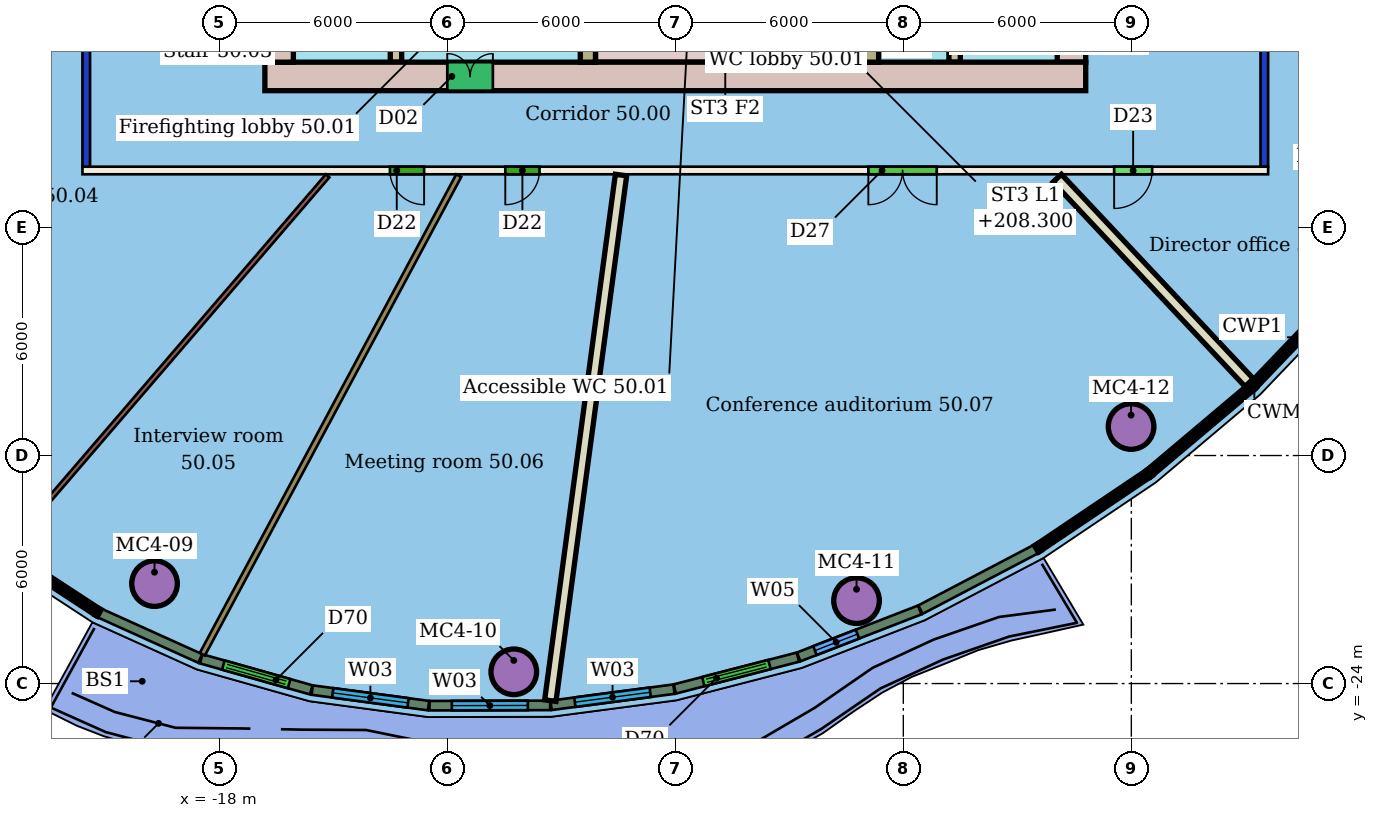
"""IFC4 building model, lengths in metres.
Left out: names, types, materials, properties, quantities, classifications, styles, units other than length and angle.
Written with IfcOpenShell. Run it as: python <this file> out.ifc"""

import sys

from ifc_helpers import new_model, si_unit, direction, frame, frame_2d, origin, origin_2d, place, context, subcontext, project, spatial, rectangle, hollow_circle, extrude, element, fill, save


model = new_model("IFC4")
c1 = context("Model", 3, precision=1e-05, world=origin(), true_north=direction((0.0, 1.0)))
c2 = subcontext(c1, "Body", "Model", "MODEL_VIEW")
j1 = project(units=[si_unit("LENGTHUNIT", "METRE"), si_unit("PLANEANGLEUNIT", "RADIAN")], contexts=[c1])
p1 = place(None, origin())
s1 = spatial("IfcSite", under=j1, at=p1, CompositionType="ELEMENT")
p2 = place(p1, origin())
s2 = spatial("IfcBuilding", under=s1, at=p2, CompositionType="ELEMENT")
p3 = place(p2, frame((0.0, 0.0, 206.5)))
s3 = spatial("IfcBuildingStorey", under=s2, at=p3, CompositionType="ELEMENT", Elevation=206.5)
for number, where, z_axis, x_axis in (
    (1, (-19.704, -21.37, 0.0), (0.0, 0.0, 1.0), (1.0, 0.0, 0.0)),
    (2, (-10.25, -23.691, 0.0), (0.0, 0.0, 1.0), (1.0, 0.0, 0.0)),
    (3, (-1.231, -21.819, 0.0), (0.0, 0.0, 1.0), (1.0, 0.0, 0.0)),
    (4, (5.993, -17.237, 0.0), (0.0, 0.0, 1.0), (1.0, 0.0, 0.0)),
):
    element("IfcColumn", number, at=place(p3, frame(where, z_axis=z_axis, x_axis=x_axis)), inside=s3, PredefinedType="COLUMN", context=c2, shape_type="SweptSolid", body=[
        extrude(hollow_circle(Radius=0.6, WallThickness=0.045, at=origin_2d()), origin(), (0.0, 0.0, 1.0), 3.45),
    ])
p4 = place(p3, frame((9.6, -10.5, 0.0), z_axis=(0.0, 0.0, 1.0), x_axis=(-1.0, 0.0, 0.0)))
e5 = element("IfcWall", 5, at=p4, inside=s3, PredefinedType="PARTITIONING", context=c2, shape_type="SweptSolid", body=[
    extrude(rectangle(XDim=31.2, YDim=0.2, at=frame_2d((15.6, 0.0))), origin(), (0.0, 0.0, 1.0), 3.45),
])
p5 = place(p4, frame((22.21, 0.0, 0.0)))
e6 = element("IfcOpeningElement", 6, at=p5, cuts=e5, PredefinedType="OPENING", context=c2, shape_type="SweptSolid", body=[
    extrude(rectangle(XDim=0.9, YDim=2.1, at=frame_2d((0.45, 1.05))), frame((0.0, 0.11, 0.0), z_axis=(0.0, -1.0, 0.0), x_axis=(1.0, 0.0, 0.0)), (0.0, 0.0, 1.0), 0.22),
])
p6 = place(p4, frame((19.173, 0.0, 0.0)))
e7 = element("IfcOpeningElement", 7, at=p6, cuts=e5, PredefinedType="OPENING", context=c2, shape_type="SweptSolid", body=[
    extrude(rectangle(XDim=0.9, YDim=2.1, at=frame_2d((0.45, 1.05))), frame((0.0, 0.11, 0.0), z_axis=(0.0, -1.0, 0.0), x_axis=(1.0, 0.0, 0.0)), (0.0, 0.0, 1.0), 0.22),
])
p7 = place(p4, frame((8.72, 0.0, 0.0)))
e8 = element("IfcOpeningElement", 8, at=p7, cuts=e5, PredefinedType="OPENING", context=c2, shape_type="SweptSolid", body=[
    extrude(rectangle(XDim=1.8, YDim=2.4, at=frame_2d((0.9, 1.2))), frame((0.0, 0.11, 0.0), z_axis=(0.0, -1.0, 0.0), x_axis=(1.0, 0.0, 0.0)), (0.0, 0.0, 1.0), 0.22),
])
p8 = place(p4, frame((3.052, 0.0, 0.0)))
e9 = element("IfcOpeningElement", 9, at=p8, cuts=e5, PredefinedType="OPENING", context=c2, shape_type="SweptSolid", body=[
    extrude(rectangle(XDim=1.0, YDim=2.4, at=frame_2d((0.5, 1.2))), frame((0.0, 0.11, 0.0), z_axis=(0.0, -1.0, 0.0), x_axis=(1.0, 0.0, 0.0)), (0.0, 0.0, 1.0), 0.22),
])
p9 = place(p3, frame((-21.5, -10.4, 0.0), z_axis=(0.0, 0.0, 1.0), x_axis=(0.0, 1.0, 0.0)))
e10 = element("IfcWall", 10, at=p9, inside=s3, PredefinedType="PARTITIONING", context=c2, shape_type="SweptSolid", body=[
    extrude(rectangle(XDim=20.8, YDim=0.2, at=frame_2d((10.4, 0.0))), origin(), (0.0, 0.0, 1.0), 3.05),
])
p10 = place(p9, frame((6.461, 0.0, 0.0)))
e11 = element("IfcOpeningElement", 11, at=p10, cuts=e10, PredefinedType="OPENING", context=c2, shape_type="SweptSolid", body=[
    extrude(rectangle(XDim=1.8, YDim=2.1, at=frame_2d((0.9, 1.05))), frame((0.0, 0.11, 0.0), z_axis=(0.0, -1.0, 0.0), x_axis=(1.0, 0.0, 0.0)), (0.0, 0.0, 1.0), 0.22),
])
p11 = place(p3, frame((9.5, 10.4, 0.0), z_axis=(0.0, 0.0, 1.0), x_axis=(0.0, -1.0, 0.0)))
e12 = element("IfcWall", 12, at=p11, inside=s3, PredefinedType="PARTITIONING", context=c2, shape_type="SweptSolid", body=[
    extrude(rectangle(XDim=20.8, YDim=0.2, at=frame_2d((10.4, 0.0))), origin(), (0.0, 0.0, 1.0), 3.05),
])
p12 = place(p11, frame((8.246, 0.0, 0.0)))
e13 = element("IfcOpeningElement", 13, at=p12, cuts=e12, PredefinedType="OPENING", context=c2, shape_type="SweptSolid", body=[
    extrude(rectangle(XDim=1.5, YDim=2.1, at=frame_2d((0.75, 1.05))), frame((0.0, 0.11, 0.0), z_axis=(0.0, -1.0, 0.0), x_axis=(1.0, 0.0, 0.0)), (0.0, 0.0, 1.0), 0.22),
])
p13 = place(p3, frame((-23.564, -20.427, 0.0), z_axis=(0.0, 0.0, 1.0), x_axis=(0.651952710233, 0.758259628109, 0.0)))
e14 = element("IfcWall", 14, at=p13, inside=s3, PredefinedType="PARTITIONING", context=c2, shape_type="SweptSolid", body=[
    extrude(rectangle(XDim=12.907, YDim=0.125, at=frame_2d((6.453, 0.0))), origin(), (0.0, 0.0, 1.0), 3.45),
])
p14 = place(p3, frame((-18.445, -23.228, 0.0), z_axis=(0.0, 0.0, 1.0), x_axis=(0.472259350385, 0.881459645119, 0.0)))
e15 = element("IfcWall", 15, at=p14, inside=s3, PredefinedType="PARTITIONING", context=c2, shape_type="SweptSolid", body=[
    extrude(rectangle(XDim=14.286, YDim=0.15, at=frame_2d((7.143, 0.0))), origin(), (0.0, 0.0, 1.0), 3.45),
])
p15 = place(p3, frame((-9.289, -24.45, 0.0), z_axis=(0.0, 0.0, 1.0), x_axis=(0.133318818673, 0.991073202436, 0.0)))
e16 = element("IfcWall", 16, at=p15, inside=s3, PredefinedType="PARTITIONING", context=c2, shape_type="SweptSolid", body=[
    extrude(rectangle(XDim=13.954, YDim=0.3, at=frame_2d((6.977, 0.0))), origin(), (0.0, 0.0, 1.0), 3.45),
])
p16 = place(p3, frame((9.102, -16.082, 0.0), z_axis=(0.0, 0.0, 1.0), x_axis=(-0.684541774507, 0.728973633923, 0.0)))
e17 = element("IfcWall", 17, at=p16, inside=s3, PredefinedType="PARTITIONING", context=c2, shape_type="SweptSolid", body=[
    extrude(rectangle(XDim=7.379, YDim=0.3, at=frame_2d((3.69, 0.0))), origin(), (0.0, 0.0, 1.0), 3.45),
])
p17 = place(p3, frame((15.501, -7.756, 0.0), z_axis=(0.0, 0.0, 1.0), x_axis=(-0.940683105583, 0.339286449583, 0.0)))
e18 = element("IfcWall", 18, at=p17, inside=s3, PredefinedType="PARTITIONING", context=c2, shape_type="SweptSolid", body=[
    extrude(rectangle(XDim=6.251, YDim=0.125, at=frame_2d((3.125, 0.0))), origin(), (0.0, 0.0, 1.0), 3.45),
])
p18 = place(p3, frame((-21.144, -22.147, 0.0), z_axis=(0.0, 0.0, 1.0), x_axis=(0.91141845893, -0.411480731897, 0.0)))
e19 = element("IfcWall", 19, at=p18, inside=s3, PredefinedType="SOLIDWALL", context=c2, shape_type="SweptSolid", body=[
    extrude(rectangle(XDim=2.901, YDim=0.25, at=frame_2d((1.45, 0.0))), origin(), (0.0, 0.0, 1.0), 3.1),
])
p19 = place(p3, frame((-18.475, -23.349, 0.0), z_axis=(0.0, 0.0, 1.0), x_axis=(0.962400743331, -0.271633593717, 0.0)))
e20 = element("IfcWall", 20, at=p19, inside=s3, PredefinedType="SOLIDWALL", context=c2, shape_type="SweptSolid", body=[
    extrude(rectangle(XDim=3.009, YDim=0.25, at=frame_2d((1.504, 0.0))), origin(), (0.0, 0.0, 1.0), 3.1),
])
p20 = place(p19, frame((0.604, 0.0, 0.0)))
e21 = element("IfcOpeningElement", 21, at=p20, cuts=e20, PredefinedType="OPENING", context=c2, shape_type="SweptSolid", body=[
    extrude(rectangle(XDim=1.8, YDim=2.4, at=frame_2d((0.9, 1.2))), frame((0.0, 0.135, 0.0), z_axis=(0.0, -1.0, 0.0), x_axis=(1.0, 0.0, 0.0)), (0.0, 0.0, 1.0), 0.27),
])
p21 = place(p3, frame((-15.554, -24.172, 0.0), z_axis=(0.0, 0.0, 1.0), x_axis=(0.99120717839, -0.132319044388, 0.0)))
e22 = element("IfcWall", 22, at=p21, inside=s3, PredefinedType="SOLIDWALL", context=c2, shape_type="SweptSolid", body=[
    extrude(rectangle(XDim=3.089, YDim=0.25, at=frame_2d((1.544, 0.0))), origin(), (0.0, 0.0, 1.0), 3.1),
])
p22 = place(p21, frame((0.544, 0.0, 0.9)))
e23 = element("IfcOpeningElement", 23, at=p22, cuts=e22, PredefinedType="OPENING", context=c2, shape_type="SweptSolid", body=[
    extrude(rectangle(XDim=2.0, YDim=2.1, at=frame_2d((1.0, 1.05))), frame((0.0, 0.135, 0.0), z_axis=(0.0, -1.0, 0.0), x_axis=(1.0, 0.0, 0.0)), (0.0, 0.0, 1.0), 0.27),
])
p23 = place(p3, frame((-12.468, -24.582, 0.0), z_axis=(0.0, 0.0, 1.0), x_axis=(0.999996972757, 0.002460584631, 0.0)))
e24 = element("IfcWall", 24, at=p23, inside=s3, PredefinedType="SOLIDWALL", context=c2, shape_type="SweptSolid", body=[
    extrude(rectangle(XDim=3.175, YDim=0.25, at=frame_2d((1.587, 0.0))), origin(), (0.0, 0.0, 1.0), 3.1),
])
p24 = place(p23, frame((0.588, 0.0, 0.9)))
e25 = element("IfcOpeningElement", 25, at=p24, cuts=e24, PredefinedType="OPENING", context=c2, shape_type="SweptSolid", body=[
    extrude(rectangle(XDim=2.0, YDim=2.1, at=frame_2d((1.0, 1.05))), frame((0.0, 0.135, 0.0), z_axis=(0.0, -1.0, 0.0), x_axis=(1.0, 0.0, 0.0)), (0.0, 0.0, 1.0), 0.27),
])
p25 = place(p3, frame((-9.269, -24.573, 0.0), z_axis=(0.0, 0.0, 1.0), x_axis=(0.991444867529, 0.130526145465, 0.0)))
e26 = element("IfcWall", 26, at=p25, inside=s3, PredefinedType="SOLIDWALL", context=c2, shape_type="SweptSolid", body=[
    extrude(rectangle(XDim=3.262, YDim=0.25, at=frame_2d((1.631, 0.0))), origin(), (0.0, 0.0, 1.0), 3.1),
])
p26 = place(p25, frame((0.631, 0.0, 0.9)))
e27 = element("IfcOpeningElement", 27, at=p26, cuts=e26, PredefinedType="OPENING", context=c2, shape_type="SweptSolid", body=[
    extrude(rectangle(XDim=2.0, YDim=2.1, at=frame_2d((1.0, 1.05))), frame((0.0, 0.135, 0.0), z_axis=(0.0, -1.0, 0.0), x_axis=(1.0, 0.0, 0.0)), (0.0, 0.0, 1.0), 0.27),
])
p27 = place(p3, frame((-6.011, -24.143, 0.0), z_axis=(0.0, 0.0, 1.0), x_axis=(0.968152404137, 0.250361583242, 0.0)))
e28 = element("IfcWall", 28, at=p27, inside=s3, PredefinedType="SOLIDWALL", context=c2, shape_type="SweptSolid", body=[
    extrude(rectangle(XDim=3.344, YDim=0.25, at=frame_2d((1.672, 0.0))), origin(), (0.0, 0.0, 1.0), 3.1),
])
p28 = place(p27, frame((0.772, 0.0, 0.0)))
e29 = element("IfcOpeningElement", 29, at=p28, cuts=e28, PredefinedType="OPENING", context=c2, shape_type="SweptSolid", body=[
    extrude(rectangle(XDim=1.8, YDim=2.4, at=frame_2d((0.9, 1.2))), frame((0.0, 0.135, 0.0), z_axis=(0.0, -1.0, 0.0), x_axis=(1.0, 0.0, 0.0)), (0.0, 0.0, 1.0), 0.27),
])
p29 = place(p3, frame((-2.753, -23.299, 0.0), z_axis=(0.0, 0.0, 1.0), x_axis=(0.932349015041, 0.361559558236, 0.0)))
e30 = element("IfcWall", 30, at=p29, inside=s3, PredefinedType="SOLIDWALL", context=c2, shape_type="SweptSolid", body=[
    extrude(rectangle(XDim=3.415, YDim=0.25, at=frame_2d((1.708, 0.0))), origin(), (0.0, 0.0, 1.0), 3.1),
])
p30 = place(p29, frame((0.458, 0.0, 0.9)))
e31 = element("IfcOpeningElement", 31, at=p30, cuts=e30, PredefinedType="OPENING", context=c2, shape_type="SweptSolid", body=[
    extrude(rectangle(XDim=1.2, YDim=2.1, at=frame_2d((0.6, 1.05))), frame((0.0, 0.135, 0.0), z_axis=(0.0, -1.0, 0.0), x_axis=(1.0, 0.0, 0.0)), (0.0, 0.0, 1.0), 0.27),
])
p31 = place(p3, frame((0.452, -22.054, 0.0), z_axis=(0.0, 0.0, 1.0), x_axis=(0.885763231358, 0.464137369724, 0.0)))
e32 = element("IfcWall", 32, at=p31, inside=s3, PredefinedType="SOLIDWALL", context=c2, shape_type="SweptSolid", body=[
    extrude(rectangle(XDim=3.428, YDim=0.25, at=frame_2d((1.714, 0.0))), origin(), (0.0, 0.0, 1.0), 3.1),
])
p32 = place(p3, frame((-16.8, -8.025, 0.0), z_axis=(0.0, 0.0, 1.0), x_axis=(1.0, 0.0, 0.0)))
e33 = element("IfcWall", 33, at=p32, inside=s3, PredefinedType="SHEAR", context=c2, shape_type="SweptSolid", body=[
    extrude(rectangle(XDim=21.6, YDim=0.75, at=frame_2d((10.8, 0.0))), origin(), (0.0, 0.0, 1.0), 3.3),
])
p33 = place(p32, frame((4.8, 0.0, 0.0)))
e34 = element("IfcOpeningElement", 34, at=p33, cuts=e33, PredefinedType="OPENING", context=c2, shape_type="SweptSolid", body=[
    extrude(rectangle(XDim=1.2, YDim=2.1, at=frame_2d((0.6, 1.05))), frame((0.0, 0.385, 0.0), z_axis=(0.0, -1.0, 0.0), x_axis=(1.0, 0.0, 0.0)), (0.0, 0.0, 1.0), 0.77),
])
p34 = place(p3, frame((-16.425, 7.65, 0.0), z_axis=(0.0, 0.0, 1.0), x_axis=(0.0, -1.0, 0.0)))
e35 = element("IfcWall", 35, at=p34, inside=s3, PredefinedType="SHEAR", context=c2, shape_type="SweptSolid", body=[
    extrude(rectangle(XDim=15.3, YDim=0.75, at=frame_2d((7.65, 0.0))), origin(), (0.0, 0.0, 1.0), 3.3),
])
p35 = place(p34, frame((11.25, 0.0, 0.0)))
e36 = element("IfcOpeningElement", 36, at=p35, cuts=e35, PredefinedType="OPENING", context=c2, shape_type="SweptSolid", body=[
    extrude(rectangle(XDim=1.2, YDim=2.1, at=frame_2d((0.6, 1.05))), frame((0.0, 0.385, 0.0), z_axis=(0.0, -1.0, 0.0), x_axis=(1.0, 0.0, 0.0)), (0.0, 0.0, 1.0), 0.77),
])
p36 = place(p34, frame((2.85, 0.0, 0.0)))
e37 = element("IfcOpeningElement", 37, at=p36, cuts=e35, PredefinedType="OPENING", context=c2, shape_type="SweptSolid", body=[
    extrude(rectangle(XDim=1.2, YDim=2.1, at=frame_2d((0.6, 1.05))), frame((0.0, 0.385, 0.0), z_axis=(0.0, -1.0, 0.0), x_axis=(1.0, 0.0, 0.0)), (0.0, 0.0, 1.0), 0.77),
])
p37 = place(p3, frame((4.425, -7.65, 0.0), z_axis=(0.0, 0.0, 1.0), x_axis=(0.0, 1.0, 0.0)))
e38 = element("IfcWall", 38, at=p37, inside=s3, PredefinedType="SHEAR", context=c2, shape_type="SweptSolid", body=[
    extrude(rectangle(XDim=15.3, YDim=0.75, at=frame_2d((7.65, 0.0))), origin(), (0.0, 0.0, 1.0), 3.3),
])
p38 = place(p37, frame((2.85, 0.0, 0.0)))
e39 = element("IfcOpeningElement", 39, at=p38, cuts=e38, PredefinedType="OPENING", context=c2, shape_type="SweptSolid", body=[
    extrude(rectangle(XDim=1.2, YDim=2.1, at=frame_2d((0.6, 1.05))), frame((0.0, 0.385, 0.0), z_axis=(0.0, -1.0, 0.0), x_axis=(1.0, 0.0, 0.0)), (0.0, 0.0, 1.0), 0.77),
])
p39 = place(p37, frame((11.25, 0.0, 0.0)))
e40 = element("IfcOpeningElement", 40, at=p39, cuts=e38, PredefinedType="OPENING", context=c2, shape_type="SweptSolid", body=[
    extrude(rectangle(XDim=1.2, YDim=2.1, at=frame_2d((0.6, 1.05))), frame((0.0, 0.385, 0.0), z_axis=(0.0, -1.0, 0.0), x_axis=(1.0, 0.0, 0.0)), (0.0, 0.0, 1.0), 0.77),
])
p40 = place(p3, frame((-13.35, 7.65, 0.0), z_axis=(0.0, 0.0, 1.0), x_axis=(0.0, -1.0, 0.0)))
e41 = element("IfcWall", 41, at=p40, inside=s3, PredefinedType="SHEAR", context=c2, shape_type="SweptSolid", body=[
    extrude(rectangle(XDim=15.3, YDim=0.3, at=frame_2d((7.65, 0.0))), origin(), (0.0, 0.0, 1.0), 3.3),
])
p41 = place(p40, frame((6.9, 0.0, 0.0)))
e42 = element("IfcOpeningElement", 42, at=p41, cuts=e41, PredefinedType="OPENING", context=c2, shape_type="SweptSolid", body=[
    extrude(rectangle(XDim=1.5, YDim=2.1, at=frame_2d((0.75, 1.05))), frame((0.0, 0.16, 0.0), z_axis=(0.0, -1.0, 0.0), x_axis=(1.0, 0.0, 0.0)), (0.0, 0.0, 1.0), 0.32),
])
p42 = place(p3, frame((1.35, -7.65, 0.0), z_axis=(0.0, 0.0, 1.0), x_axis=(0.0, 1.0, 0.0)))
e43 = element("IfcWall", 43, at=p42, inside=s3, PredefinedType="SHEAR", context=c2, shape_type="SweptSolid", body=[
    extrude(rectangle(XDim=15.3, YDim=0.3, at=frame_2d((7.65, 0.0))), origin(), (0.0, 0.0, 1.0), 3.3),
])
p43 = place(p42, frame((1.56, 0.0, 0.0)))
e44 = element("IfcOpeningElement", 44, at=p43, cuts=e43, PredefinedType="OPENING", context=c2, shape_type="SweptSolid", body=[
    extrude(rectangle(XDim=1.0, YDim=2.1, at=frame_2d((0.5, 1.05))), frame((0.0, 0.16, 0.0), z_axis=(0.0, -1.0, 0.0), x_axis=(1.0, 0.0, 0.0)), (0.0, 0.0, 1.0), 0.32),
])
p44 = place(p42, frame((6.9, 0.0, 0.0)))
e45 = element("IfcOpeningElement", 45, at=p44, cuts=e43, PredefinedType="OPENING", context=c2, shape_type="SweptSolid", body=[
    extrude(rectangle(XDim=1.5, YDim=2.1, at=frame_2d((0.75, 1.05))), frame((0.0, 0.16, 0.0), z_axis=(0.0, -1.0, 0.0), x_axis=(1.0, 0.0, 0.0)), (0.0, 0.0, 1.0), 0.32),
])
p45 = place(p3, frame((-8.3, -3.88, 0.0), z_axis=(0.0, 0.0, 1.0), x_axis=(0.0, -1.0, 0.0)))
e46 = element("IfcWall", 46, at=p45, inside=s3, PredefinedType="SHEAR", context=c2, shape_type="SweptSolid", body=[
    extrude(rectangle(XDim=3.77, YDim=0.4, at=frame_2d((1.885, 0.0))), origin(), (0.0, 0.0, 1.0), 3.3),
])
p46 = place(p45, frame((1.11, 0.0, 0.0)))
e47 = element("IfcOpeningElement", 47, at=p46, cuts=e46, PredefinedType="OPENING", context=c2, shape_type="SweptSolid", body=[
    extrude(rectangle(XDim=1.2, YDim=2.1, at=frame_2d((0.6, 1.05))), frame((0.0, 0.21, 0.0), z_axis=(0.0, -1.0, 0.0), x_axis=(1.0, 0.0, 0.0)), (0.0, 0.0, 1.0), 0.42),
])
p47 = place(p3, frame((-0.85, -3.88, 0.0), z_axis=(0.0, 0.0, 1.0), x_axis=(0.0, -1.0, 0.0)))
e48 = element("IfcWall", 48, at=p47, inside=s3, PredefinedType="SHEAR", context=c2, shape_type="SweptSolid", body=[
    extrude(rectangle(XDim=3.77, YDim=0.4, at=frame_2d((1.885, 0.0))), origin(), (0.0, 0.0, 1.0), 3.3),
])
p48 = place(p3, frame((-8.1, -7.475, 0.0), z_axis=(0.0, 0.0, 1.0), x_axis=(1.0, 0.0, 0.0)))
e49 = element("IfcWall", 49, at=p48, inside=s3, PredefinedType="SHEAR", context=c2, shape_type="SweptSolid", body=[
    extrude(rectangle(XDim=7.05, YDim=0.35, at=frame_2d((3.525, 0.0))), origin(), (0.0, 0.0, 1.0), 3.3),
])
p49 = place(p5, origin())
e50 = element("IfcDoor", 50, at=p49, inside=s3, OperationType="SINGLE_SWING_LEFT", PredefinedType="DOOR", context=c2, shape_type="SweptSolid", body=[
    extrude(rectangle(XDim=0.9, YDim=2.1, at=frame_2d((0.45, 1.05))), frame((0.0, 0.025, 0.0), z_axis=(0.0, -1.0, 0.0), x_axis=(1.0, 0.0, 0.0)), (0.0, 0.0, 1.0), 0.05),
])
fill(e6, e50)
p50 = place(p6, origin())
e51 = element("IfcDoor", 51, at=p50, inside=s3, OperationType="SINGLE_SWING_RIGHT", PredefinedType="DOOR", context=c2, shape_type="SweptSolid", body=[
    extrude(rectangle(XDim=0.9, YDim=2.1, at=frame_2d((0.45, 1.05))), frame((0.0, 0.025, 0.0), z_axis=(0.0, -1.0, 0.0), x_axis=(1.0, 0.0, 0.0)), (0.0, 0.0, 1.0), 0.05),
])
fill(e7, e51)
p51 = place(p7, origin())
e52 = element("IfcDoor", 52, at=p51, inside=s3, OperationType="DOUBLE_DOOR_SINGLE_SWING", PredefinedType="DOOR", context=c2, shape_type="SweptSolid", body=[
    extrude(rectangle(XDim=1.8, YDim=2.4, at=frame_2d((0.9, 1.2))), frame((0.0, 0.025, 0.0), z_axis=(0.0, -1.0, 0.0), x_axis=(1.0, 0.0, 0.0)), (0.0, 0.0, 1.0), 0.05),
])
fill(e8, e52)
p52 = place(p8, origin())
e53 = element("IfcDoor", 53, at=p52, inside=s3, OperationType="SINGLE_SWING_RIGHT", PredefinedType="DOOR", context=c2, shape_type="SweptSolid", body=[
    extrude(rectangle(XDim=1.0, YDim=2.4, at=frame_2d((0.5, 1.2))), frame((0.0, 0.025, 0.0), z_axis=(0.0, -1.0, 0.0), x_axis=(1.0, 0.0, 0.0)), (0.0, 0.0, 1.0), 0.05),
])
fill(e9, e53)
p53 = place(p20, origin())
e54 = element("IfcDoor", 54, at=p53, inside=s3, OperationType="DOUBLE_DOOR_SLIDING", PredefinedType="DOOR", context=c2, shape_type="SweptSolid", body=[
    extrude(rectangle(XDim=1.8, YDim=2.4, at=frame_2d((0.9, 1.2))), frame((0.0, 0.025, 0.0), z_axis=(0.0, -1.0, 0.0), x_axis=(1.0, 0.0, 0.0)), (0.0, 0.0, 1.0), 0.05),
])
fill(e21, e54)
p54 = place(p22, origin())
e55 = element("IfcWindow", 55, at=p54, inside=s3, PartitioningType="SINGLE_PANEL", PredefinedType="WINDOW", context=c2, shape_type="SweptSolid", body=[
    extrude(rectangle(XDim=2.0, YDim=2.1, at=frame_2d((1.0, 1.05))), frame((0.0, 0.03, 0.0), z_axis=(0.0, -1.0, 0.0), x_axis=(1.0, 0.0, 0.0)), (0.0, 0.0, 1.0), 0.06),
])
fill(e23, e55)
p55 = place(p24, origin())
e56 = element("IfcWindow", 56, at=p55, inside=s3, PartitioningType="SINGLE_PANEL", PredefinedType="WINDOW", context=c2, shape_type="SweptSolid", body=[
    extrude(rectangle(XDim=2.0, YDim=2.1, at=frame_2d((1.0, 1.05))), frame((0.0, 0.03, 0.0), z_axis=(0.0, -1.0, 0.0), x_axis=(1.0, 0.0, 0.0)), (0.0, 0.0, 1.0), 0.06),
])
fill(e25, e56)
p56 = place(p26, origin())
e57 = element("IfcWindow", 57, at=p56, inside=s3, PartitioningType="SINGLE_PANEL", PredefinedType="WINDOW", context=c2, shape_type="SweptSolid", body=[
    extrude(rectangle(XDim=2.0, YDim=2.1, at=frame_2d((1.0, 1.05))), frame((0.0, 0.03, 0.0), z_axis=(0.0, -1.0, 0.0), x_axis=(1.0, 0.0, 0.0)), (0.0, 0.0, 1.0), 0.06),
])
fill(e27, e57)
p57 = place(p28, origin())
e58 = element("IfcDoor", 58, at=p57, inside=s3, OperationType="DOUBLE_DOOR_SLIDING", PredefinedType="DOOR", context=c2, shape_type="SweptSolid", body=[
    extrude(rectangle(XDim=1.8, YDim=2.4, at=frame_2d((0.9, 1.2))), frame((0.0, 0.025, 0.0), z_axis=(0.0, -1.0, 0.0), x_axis=(1.0, 0.0, 0.0)), (0.0, 0.0, 1.0), 0.05),
])
fill(e29, e58)
p58 = place(p30, origin())
e59 = element("IfcWindow", 59, at=p58, inside=s3, PartitioningType="SINGLE_PANEL", PredefinedType="WINDOW", context=c2, shape_type="SweptSolid", body=[
    extrude(rectangle(XDim=1.2, YDim=2.1, at=frame_2d((0.6, 1.05))), frame((0.0, 0.03, 0.0), z_axis=(0.0, -1.0, 0.0), x_axis=(1.0, 0.0, 0.0)), (0.0, 0.0, 1.0), 0.06),
])
fill(e31, e59)
p59 = place(p33, origin())
e60 = element("IfcDoor", 60, at=p59, inside=s3, OperationType="DOUBLE_DOOR_SINGLE_SWING", PredefinedType="NOTDEFINED", context=c2, shape_type="SweptSolid", body=[
    extrude(rectangle(XDim=1.2, YDim=2.1, at=frame_2d((0.6, 1.05))), frame((0.0, 0.025, 0.0), z_axis=(0.0, -1.0, 0.0), x_axis=(1.0, 0.0, 0.0)), (0.0, 0.0, 1.0), 0.05),
])
fill(e34, e60)
save(model, sys.argv[1])
